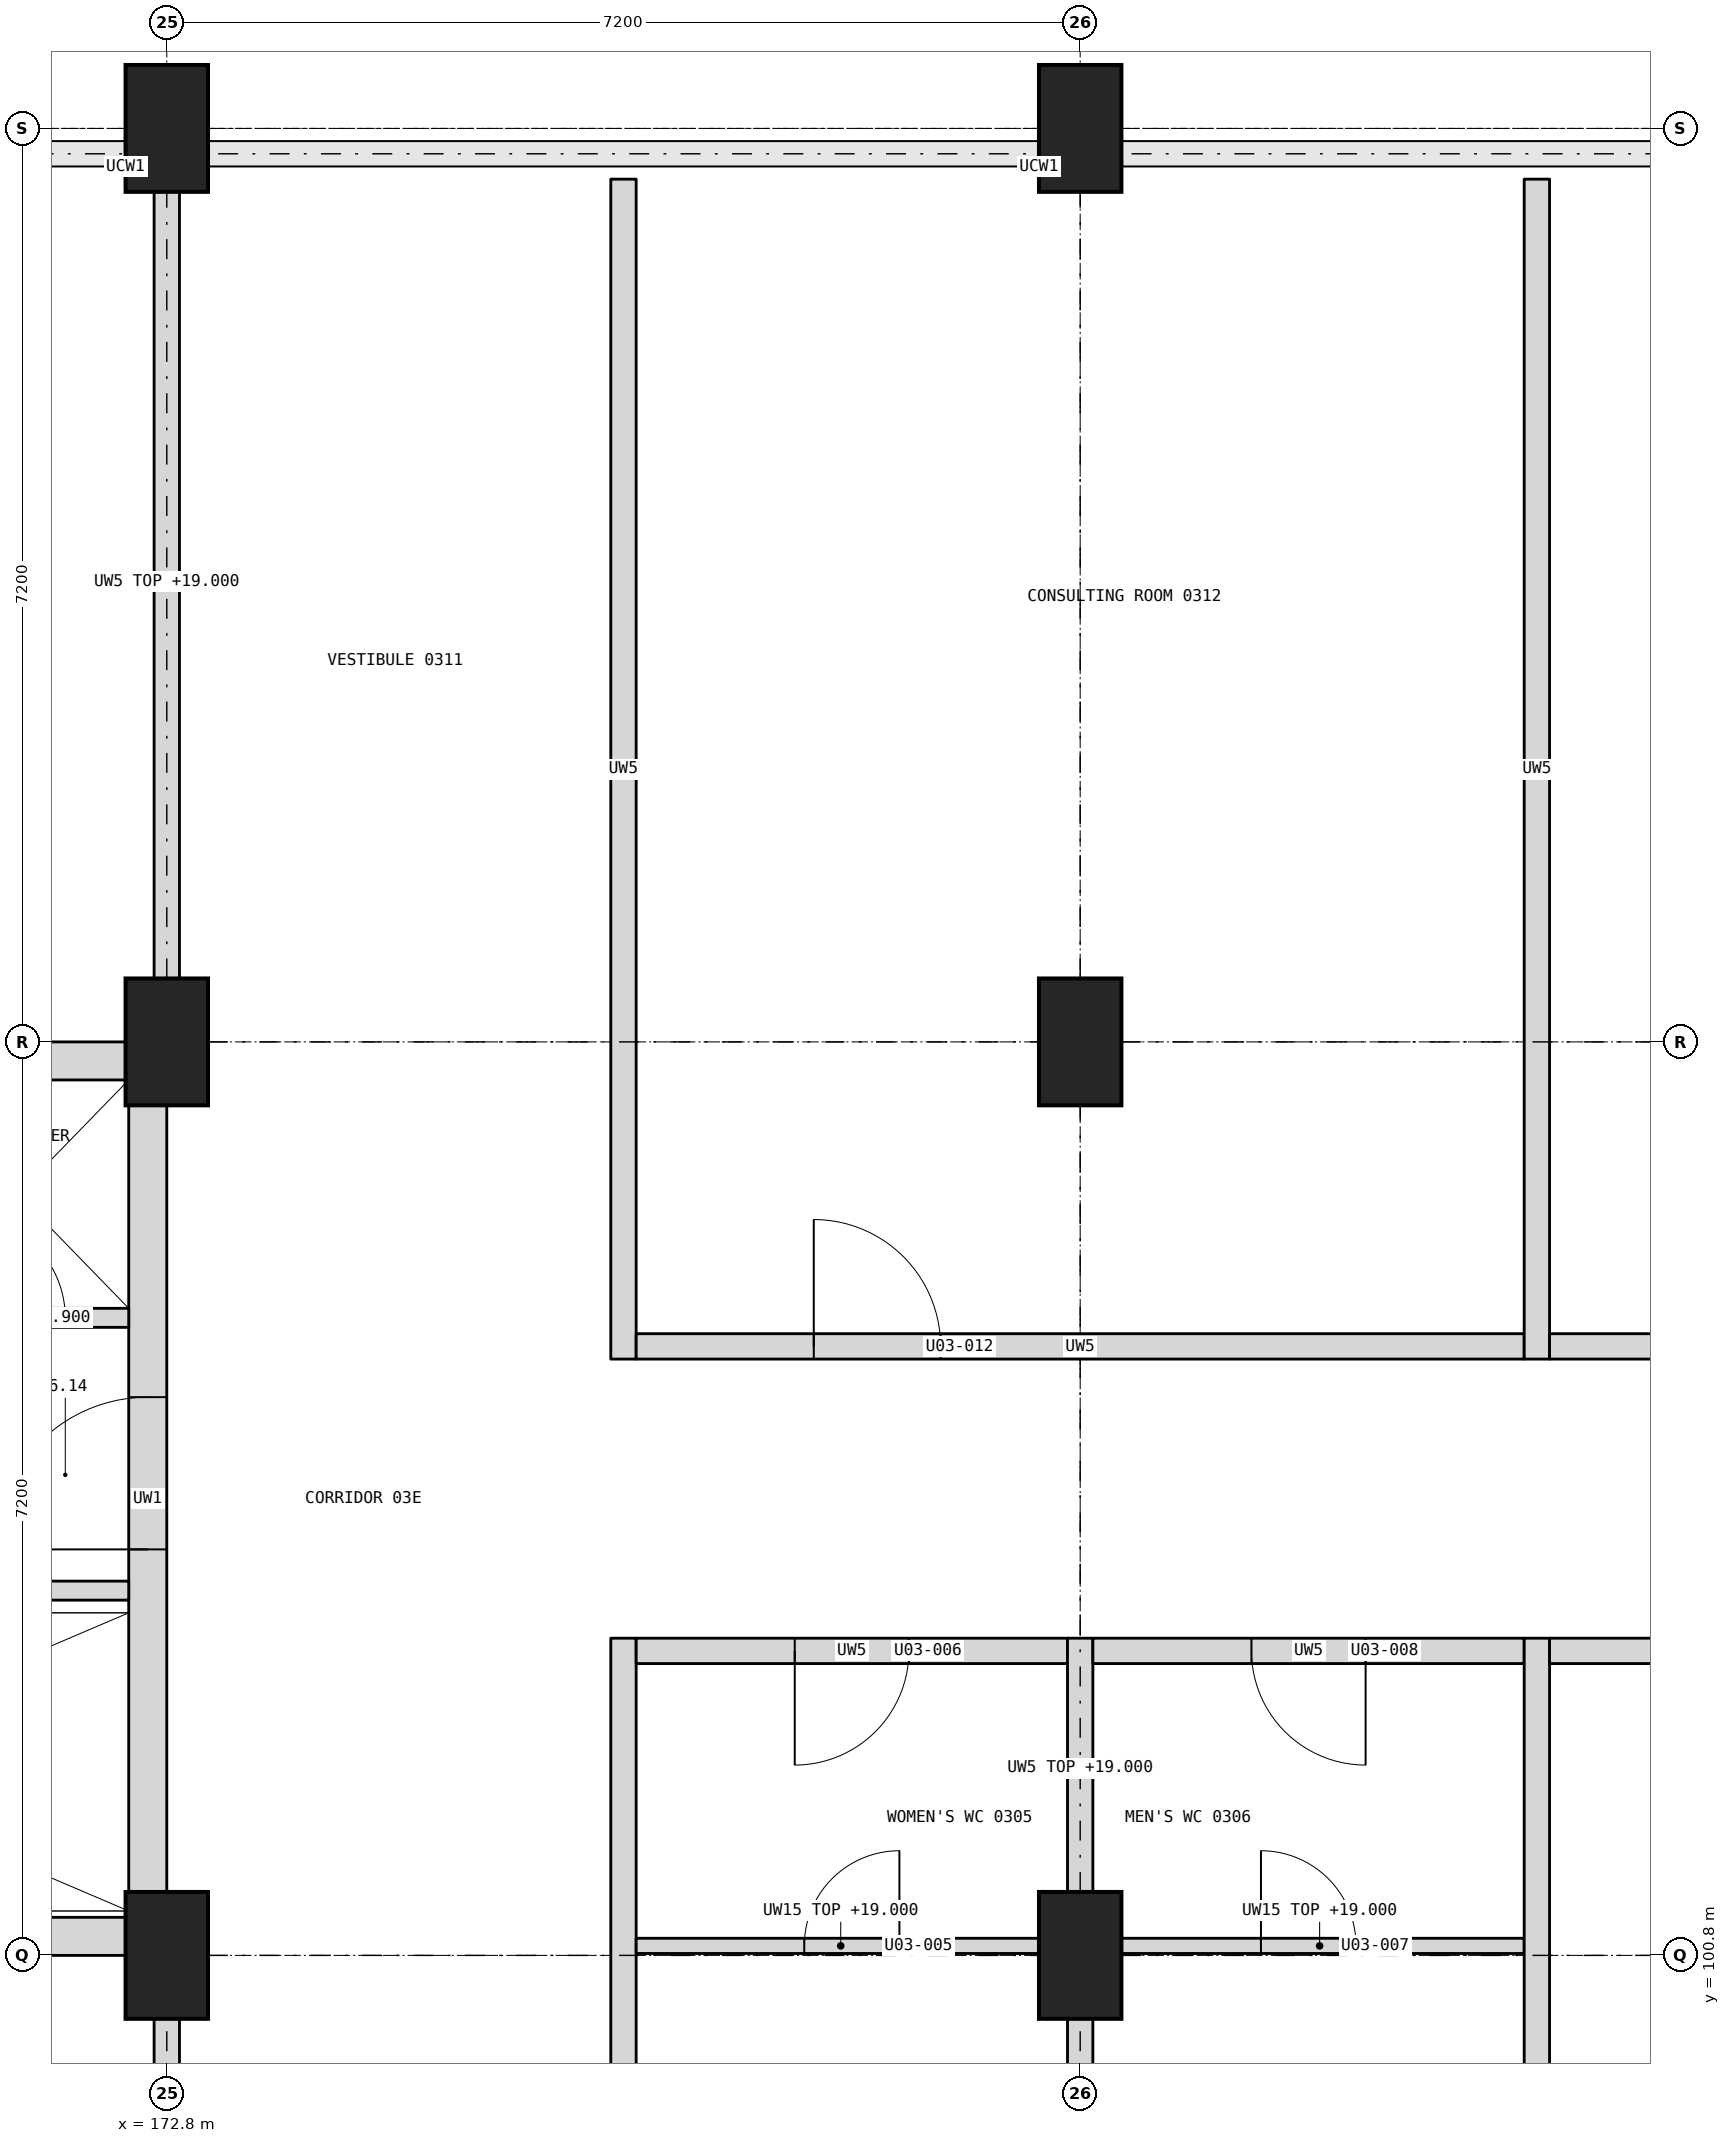
"""IFC4 building model, lengths in metres.
Left out: names, types, materials, properties, quantities, classifications, styles, units other than length and angle.
Written with IfcOpenShell. Run it as: python <this file> out.ifc"""

import sys

from ifc_helpers import new_model, si_unit, direction, frame, frame_2d, origin, origin_2d, place, context, subcontext, project, spatial, rectangle, extrude, element, fill, save


model = new_model("IFC4")
c1 = context("Model", 3, precision=1e-05, world=origin(), true_north=direction((0.0, 1.0)))
c2 = subcontext(c1, "Body", "Model", "MODEL_VIEW")
j1 = project(units=[si_unit("LENGTHUNIT", "METRE"), si_unit("PLANEANGLEUNIT", "RADIAN")], contexts=[c1])
p1 = place(None, origin())
s1 = spatial("IfcSite", under=j1, at=p1, CompositionType="ELEMENT")
p2 = place(p1, origin())
s2 = spatial("IfcBuilding", under=s1, at=p2, CompositionType="ELEMENT")
p3 = place(p2, frame((0.0, 0.0, 16.5)))
s3 = spatial("IfcBuildingStorey", under=s2, at=p3, CompositionType="ELEMENT", Elevation=16.5)
for number, where, z_axis, x_axis in (
    (1, (172.8, 100.8, 0.0), (0.0, 0.0, 1.0), (1.0, 0.0, 0.0)),
    (2, (172.8, 108.0, 0.0), (0.0, 0.0, 1.0), (1.0, 0.0, 0.0)),
    (3, (172.8, 115.2, 0.0), (0.0, 0.0, 1.0), (1.0, 0.0, 0.0)),
    (4, (180.0, 100.8, 0.0), (0.0, 0.0, 1.0), (1.0, 0.0, 0.0)),
    (5, (180.0, 108.0, 0.0), (0.0, 0.0, 1.0), (1.0, 0.0, 0.0)),
    (6, (180.0, 115.2, 0.0), (0.0, 0.0, 1.0), (1.0, 0.0, 0.0)),
):
    element("IfcColumn", number, at=place(p3, frame(where, z_axis=z_axis, x_axis=x_axis)), inside=s3, PredefinedType="COLUMN", context=c2, shape_type="SweptSolid", body=[
        extrude(rectangle(XDim=0.65, YDim=1.0, at=origin_2d()), origin(), (0.0, 0.0, 1.0), 3.4),
    ])
for number, where, z_axis, x_axis in (
    (7, (158.4, 100.95, 0.0), (0.0, 0.0, 1.0), (1.0, 0.0, 0.0)),
    (8, (158.4, 107.85, 0.0), (0.0, 0.0, 1.0), (1.0, 0.0, 0.0)),
):
    element("IfcWall", number, at=place(p3, frame(where, z_axis=z_axis, x_axis=x_axis)), inside=s3, PredefinedType="SHEAR", context=c2, shape_type="SweptSolid", body=[
        extrude(rectangle(XDim=14.4, YDim=0.3, at=frame_2d((7.2, 0.0))), origin(), (0.0, 0.0, 1.0), 3.4),
    ])
p4 = place(p3, frame((172.65, 101.1, 0.0), z_axis=(0.0, 0.0, 1.0), x_axis=(0.0, 1.0, 0.0)))
e9 = element("IfcWall", 9, at=p4, inside=s3, PredefinedType="SHEAR", context=c2, shape_type="SweptSolid", body=[
    extrude(rectangle(XDim=6.6, YDim=0.3, at=frame_2d((3.3, 0.0))), origin(), (0.0, 0.0, 1.0), 3.4),
])
p5 = place(p4, frame((2.9, 0.0, 0.0)))
e10 = element("IfcOpeningElement", 10, at=p5, cuts=e9, PredefinedType="OPENING", context=c2, shape_type="SweptSolid", body=[
    extrude(rectangle(XDim=1.2, YDim=2.1, at=frame_2d((0.6, 1.05))), frame((0.0, 0.16, 0.0), z_axis=(0.0, -1.0, 0.0), x_axis=(1.0, 0.0, 0.0)), (0.0, 0.0, 1.0), 0.32),
])
p6 = place(p3, frame((165.75, 103.675, 0.0), z_axis=(0.0, 0.0, 1.0), x_axis=(1.0, 0.0, 0.0)))
e11 = element("IfcWall", 11, at=p6, inside=s3, PredefinedType="SHEAR", context=c2, shape_type="SweptSolid", body=[
    extrude(rectangle(XDim=6.75, YDim=0.15, at=frame_2d((3.375, 0.0))), origin(), (0.0, 0.0, 1.0), 3.4),
])
p7 = place(p6, frame((0.1, 0.0, 0.0)))
e12 = element("IfcOpeningElement", 12, at=p7, cuts=e11, PredefinedType="OPENING", context=c2, shape_type="SweptSolid", body=[
    extrude(rectangle(XDim=1.0, YDim=2.1, at=frame_2d((0.5, 1.05))), frame((0.0, 0.085, 0.0), z_axis=(0.0, -1.0, 0.0), x_axis=(1.0, 0.0, 0.0)), (0.0, 0.0, 1.0), 0.17),
])
p8 = place(p3, frame((170.75, 105.825, 0.0), z_axis=(0.0, 0.0, 1.0), x_axis=(1.0, 0.0, 0.0)))
e13 = element("IfcWall", 13, at=p8, inside=s3, PredefinedType="PARTITIONING", context=c2, shape_type="SweptSolid", body=[
    extrude(rectangle(XDim=1.75, YDim=0.15, at=frame_2d((0.875, 0.0))), origin(), (0.0, 0.0, 1.0), 3.4),
])
p9 = place(p8, frame((0.45, 0.0, 0.0)))
e14 = element("IfcOpeningElement", 14, at=p9, cuts=e13, PredefinedType="OPENING", context=c2, shape_type="SweptSolid", body=[
    extrude(rectangle(XDim=0.8, YDim=2.1, at=frame_2d((0.4, 1.05))), frame((0.0, 0.085, 0.0), z_axis=(0.0, -1.0, 0.0), x_axis=(1.0, 0.0, 0.0)), (0.0, 0.0, 1.0), 0.17),
])
p10 = place(p3, frame((172.8, 94.0, 0.0), z_axis=(0.0, 0.0, 1.0), x_axis=(0.0, 1.0, 0.0)))
e15 = element("IfcWall", 15, at=p10, inside=s3, PredefinedType="PARTITIONING", context=c2, shape_type="SweptSolid", body=[
    extrude(rectangle(XDim=6.35, YDim=0.2, at=frame_2d((3.175, 0.0))), origin(), (0.0, 0.0, 1.0), 2.5),
])
p11 = place(p10, frame((2.3, 0.0, 0.0)))
e16 = element("IfcOpeningElement", 16, at=p11, cuts=e15, PredefinedType="OPENING", context=c2, shape_type="SweptSolid", body=[
    extrude(rectangle(XDim=1.8, YDim=2.1, at=frame_2d((0.9, 1.05))), frame((0.0, 0.11, 0.0), z_axis=(0.0, -1.0, 0.0), x_axis=(1.0, 0.0, 0.0)), (0.0, 0.0, 1.0), 0.22),
])
p12 = place(p3, frame((176.4, 94.0, 0.0), z_axis=(0.0, 0.0, 1.0), x_axis=(0.0, 1.0, 0.0)))
e17 = element("IfcWall", 17, at=p12, inside=s3, PredefinedType="PARTITIONING", context=c2, shape_type="SweptSolid", body=[
    extrude(rectangle(XDim=9.3, YDim=0.2, at=frame_2d((4.65, 0.0))), origin(), (0.0, 0.0, 1.0), 3.1),
])
p13 = place(p3, frame((176.5, 100.875, 0.0), z_axis=(0.0, 0.0, 1.0), x_axis=(1.0, 0.0, 0.0)))
e18 = element("IfcWall", 18, at=p13, inside=s3, PredefinedType="PARTITIONING", context=c2, shape_type="SweptSolid", body=[
    extrude(rectangle(XDim=3.225, YDim=0.12, at=frame_2d((1.613, 0.0))), origin(), (0.0, 0.0, 1.0), 2.5),
])
p14 = place(p13, frame((1.325, 0.0, 0.0)))
e19 = element("IfcOpeningElement", 19, at=p14, cuts=e18, PredefinedType="OPENING", context=c2, shape_type="SweptSolid", body=[
    extrude(rectangle(XDim=0.75, YDim=2.1, at=frame_2d((0.375, 1.05))), frame((0.0, 0.07, 0.0), z_axis=(0.0, -1.0, 0.0), x_axis=(1.0, 0.0, 0.0)), (0.0, 0.0, 1.0), 0.14),
])
p15 = place(p3, frame((176.5, 103.2, 0.0), z_axis=(0.0, 0.0, 1.0), x_axis=(1.0, 0.0, 0.0)))
e20 = element("IfcWall", 20, at=p15, inside=s3, PredefinedType="PARTITIONING", context=c2, shape_type="SweptSolid", body=[
    extrude(rectangle(XDim=3.4, YDim=0.2, at=frame_2d((1.7, 0.0))), origin(), (0.0, 0.0, 1.0), 3.1),
])
p16 = place(p15, frame((1.25, 0.0, 0.0)))
e21 = element("IfcOpeningElement", 21, at=p16, cuts=e20, PredefinedType="OPENING", context=c2, shape_type="SweptSolid", body=[
    extrude(rectangle(XDim=0.9, YDim=2.1, at=frame_2d((0.45, 1.05))), frame((0.0, 0.11, 0.0), z_axis=(0.0, -1.0, 0.0), x_axis=(1.0, 0.0, 0.0)), (0.0, 0.0, 1.0), 0.22),
])
p17 = place(p3, frame((180.0, 94.0, 0.0), z_axis=(0.0, 0.0, 1.0), x_axis=(0.0, 1.0, 0.0)))
e22 = element("IfcWall", 22, at=p17, inside=s3, PredefinedType="PARTITIONING", context=c2, shape_type="SweptSolid", body=[
    extrude(rectangle(XDim=6.35, YDim=0.2, at=frame_2d((3.175, 0.0))), origin(), (0.0, 0.0, 1.0), 2.5),
])
p18 = place(p3, frame((180.0, 101.25, 0.0), z_axis=(0.0, 0.0, 1.0), x_axis=(0.0, 1.0, 0.0)))
e23 = element("IfcWall", 23, at=p18, inside=s3, PredefinedType="PARTITIONING", context=c2, shape_type="SweptSolid", body=[
    extrude(rectangle(XDim=2.05, YDim=0.2, at=frame_2d((1.025, 0.0))), origin(), (0.0, 0.0, 1.0), 2.5),
])
p19 = place(p3, frame((180.275, 100.875, 0.0), z_axis=(0.0, 0.0, 1.0), x_axis=(1.0, 0.0, 0.0)))
e24 = element("IfcWall", 24, at=p19, inside=s3, PredefinedType="PARTITIONING", context=c2, shape_type="SweptSolid", body=[
    extrude(rectangle(XDim=3.225, YDim=0.12, at=frame_2d((1.613, 0.0))), origin(), (0.0, 0.0, 1.0), 2.5),
])
p20 = place(p19, frame((1.15, 0.0, 0.0)))
e25 = element("IfcOpeningElement", 25, at=p20, cuts=e24, PredefinedType="OPENING", context=c2, shape_type="SweptSolid", body=[
    extrude(rectangle(XDim=0.75, YDim=2.1, at=frame_2d((0.375, 1.05))), frame((0.0, 0.07, 0.0), z_axis=(0.0, -1.0, 0.0), x_axis=(1.0, 0.0, 0.0)), (0.0, 0.0, 1.0), 0.14),
])
p21 = place(p3, frame((180.1, 103.2, 0.0), z_axis=(0.0, 0.0, 1.0), x_axis=(1.0, 0.0, 0.0)))
e26 = element("IfcWall", 26, at=p21, inside=s3, PredefinedType="PARTITIONING", context=c2, shape_type="SweptSolid", body=[
    extrude(rectangle(XDim=3.4, YDim=0.2, at=frame_2d((1.7, 0.0))), origin(), (0.0, 0.0, 1.0), 3.1),
])
p22 = place(p21, frame((1.25, 0.0, 0.0)))
e27 = element("IfcOpeningElement", 27, at=p22, cuts=e26, PredefinedType="OPENING", context=c2, shape_type="SweptSolid", body=[
    extrude(rectangle(XDim=0.9, YDim=2.1, at=frame_2d((0.45, 1.05))), frame((0.0, 0.11, 0.0), z_axis=(0.0, -1.0, 0.0), x_axis=(1.0, 0.0, 0.0)), (0.0, 0.0, 1.0), 0.22),
])
p23 = place(p3, frame((183.6, 94.0, 0.0), z_axis=(0.0, 0.0, 1.0), x_axis=(0.0, 1.0, 0.0)))
e28 = element("IfcWall", 28, at=p23, inside=s3, PredefinedType="PARTITIONING", context=c2, shape_type="SweptSolid", body=[
    extrude(rectangle(XDim=9.3, YDim=0.2, at=frame_2d((4.65, 0.0))), origin(), (0.0, 0.0, 1.0), 3.1),
])
p24 = place(p3, frame((183.7, 103.2, 0.0), z_axis=(0.0, 0.0, 1.0), x_axis=(1.0, 0.0, 0.0)))
e29 = element("IfcWall", 29, at=p24, inside=s3, PredefinedType="PARTITIONING", context=c2, shape_type="SweptSolid", body=[
    extrude(rectangle(XDim=3.5, YDim=0.2, at=frame_2d((1.75, 0.0))), origin(), (0.0, 0.0, 1.0), 3.1),
])
p25 = place(p24, frame((1.4, 0.0, 0.0)))
e30 = element("IfcOpeningElement", 30, at=p25, cuts=e29, PredefinedType="OPENING", context=c2, shape_type="SweptSolid", body=[
    extrude(rectangle(XDim=1.0, YDim=2.1, at=frame_2d((0.5, 1.05))), frame((0.0, 0.11, 0.0), z_axis=(0.0, -1.0, 0.0), x_axis=(1.0, 0.0, 0.0)), (0.0, 0.0, 1.0), 0.22),
])
p26 = place(p3, frame((172.8, 108.45, 0.0), z_axis=(0.0, 0.0, 1.0), x_axis=(0.0, 1.0, 0.0)))
e31 = element("IfcWall", 31, at=p26, inside=s3, PredefinedType="PARTITIONING", context=c2, shape_type="SweptSolid", body=[
    extrude(rectangle(XDim=6.35, YDim=0.2, at=frame_2d((3.175, 0.0))), origin(), (0.0, 0.0, 1.0), 2.5),
])
p27 = place(p3, frame((176.4, 105.5, 0.0), z_axis=(0.0, 0.0, 1.0), x_axis=(0.0, 1.0, 0.0)))
e32 = element("IfcWall", 32, at=p27, inside=s3, PredefinedType="PARTITIONING", context=c2, shape_type="SweptSolid", body=[
    extrude(rectangle(XDim=9.3, YDim=0.2, at=frame_2d((4.65, 0.0))), origin(), (0.0, 0.0, 1.0), 3.1),
])
p28 = place(p3, frame((176.5, 105.6, 0.0), z_axis=(0.0, 0.0, 1.0), x_axis=(1.0, 0.0, 0.0)))
e33 = element("IfcWall", 33, at=p28, inside=s3, PredefinedType="PARTITIONING", context=c2, shape_type="SweptSolid", body=[
    extrude(rectangle(XDim=7.0, YDim=0.2, at=frame_2d((3.5, 0.0))), origin(), (0.0, 0.0, 1.0), 3.1),
])
p29 = place(p28, frame((1.4, 0.0, 0.0)))
e34 = element("IfcOpeningElement", 34, at=p29, cuts=e33, PredefinedType="OPENING", context=c2, shape_type="SweptSolid", body=[
    extrude(rectangle(XDim=1.0, YDim=2.1, at=frame_2d((0.5, 1.05))), frame((0.0, 0.11, 0.0), z_axis=(0.0, -1.0, 0.0), x_axis=(1.0, 0.0, 0.0)), (0.0, 0.0, 1.0), 0.22),
])
p30 = place(p3, frame((183.6, 105.5, 0.0), z_axis=(0.0, 0.0, 1.0), x_axis=(0.0, 1.0, 0.0)))
e35 = element("IfcWall", 35, at=p30, inside=s3, PredefinedType="PARTITIONING", context=c2, shape_type="SweptSolid", body=[
    extrude(rectangle(XDim=9.3, YDim=0.2, at=frame_2d((4.65, 0.0))), origin(), (0.0, 0.0, 1.0), 3.1),
])
p31 = place(p3, frame((183.7, 105.6, 0.0), z_axis=(0.0, 0.0, 1.0), x_axis=(1.0, 0.0, 0.0)))
e36 = element("IfcWall", 36, at=p31, inside=s3, PredefinedType="PARTITIONING", context=c2, shape_type="SweptSolid", body=[
    extrude(rectangle(XDim=3.5, YDim=0.2, at=frame_2d((1.75, 0.0))), origin(), (0.0, 0.0, 1.0), 3.1),
])
p32 = place(p31, frame((1.4, 0.0, 0.0)))
e37 = element("IfcOpeningElement", 37, at=p32, cuts=e36, PredefinedType="OPENING", context=c2, shape_type="SweptSolid", body=[
    extrude(rectangle(XDim=1.0, YDim=2.1, at=frame_2d((0.5, 1.05))), frame((0.0, 0.11, 0.0), z_axis=(0.0, -1.0, 0.0), x_axis=(1.0, 0.0, 0.0)), (0.0, 0.0, 1.0), 0.22),
])
p33 = place(p14, origin())
e38 = element("IfcDoor", 38, at=p33, inside=s3, OperationType="SINGLE_SWING_RIGHT", PredefinedType="DOOR", context=c2, shape_type="SweptSolid", body=[
    extrude(rectangle(XDim=0.75, YDim=2.1, at=frame_2d((0.375, 1.05))), frame((0.0, 0.025, 0.0), z_axis=(0.0, -1.0, 0.0), x_axis=(1.0, 0.0, 0.0)), (0.0, 0.0, 1.0), 0.05),
])
fill(e19, e38)
p34 = place(p16, frame((0.9, 0.0, 0.0), z_axis=(0.0, 0.0, 1.0), x_axis=(-1.0, 0.0, 0.0)))
e39 = element("IfcDoor", 39, at=p34, inside=s3, OperationType="SINGLE_SWING_RIGHT", PredefinedType="DOOR", context=c2, shape_type="SweptSolid", body=[
    extrude(rectangle(XDim=0.9, YDim=2.1, at=frame_2d((0.45, 1.05))), frame((0.0, 0.025, 0.0), z_axis=(0.0, -1.0, 0.0), x_axis=(1.0, 0.0, 0.0)), (0.0, 0.0, 1.0), 0.05),
])
fill(e21, e39)
p35 = place(p20, origin())
e40 = element("IfcDoor", 40, at=p35, inside=s3, OperationType="SINGLE_SWING_LEFT", PredefinedType="DOOR", context=c2, shape_type="SweptSolid", body=[
    extrude(rectangle(XDim=0.75, YDim=2.1, at=frame_2d((0.375, 1.05))), frame((0.0, 0.025, 0.0), z_axis=(0.0, -1.0, 0.0), x_axis=(1.0, 0.0, 0.0)), (0.0, 0.0, 1.0), 0.05),
])
fill(e25, e40)
p36 = place(p22, frame((0.9, 0.0, 0.0), z_axis=(0.0, 0.0, 1.0), x_axis=(-1.0, 0.0, 0.0)))
e41 = element("IfcDoor", 41, at=p36, inside=s3, OperationType="SINGLE_SWING_LEFT", PredefinedType="DOOR", context=c2, shape_type="SweptSolid", body=[
    extrude(rectangle(XDim=0.9, YDim=2.1, at=frame_2d((0.45, 1.05))), frame((0.0, 0.025, 0.0), z_axis=(0.0, -1.0, 0.0), x_axis=(1.0, 0.0, 0.0)), (0.0, 0.0, 1.0), 0.05),
])
fill(e27, e41)
p37 = place(p29, origin())
e42 = element("IfcDoor", 42, at=p37, inside=s3, OperationType="SINGLE_SWING_LEFT", PredefinedType="DOOR", context=c2, shape_type="SweptSolid", body=[
    extrude(rectangle(XDim=1.0, YDim=2.1, at=frame_2d((0.5, 1.05))), frame((0.0, 0.025, 0.0), z_axis=(0.0, -1.0, 0.0), x_axis=(1.0, 0.0, 0.0)), (0.0, 0.0, 1.0), 0.05),
])
fill(e34, e42)
p38 = place(p5, origin())
e43 = element("IfcDoor", 43, at=p38, inside=s3, OperationType="SINGLE_SWING_LEFT", PredefinedType="DOOR", context=c2, shape_type="SweptSolid", body=[
    extrude(rectangle(XDim=1.2, YDim=2.1, at=frame_2d((0.6, 1.05))), frame((0.0, 0.025, 0.0), z_axis=(0.0, -1.0, 0.0), x_axis=(1.0, 0.0, 0.0)), (0.0, 0.0, 1.0), 0.05),
])
fill(e10, e43)
p39 = place(p9, origin())
e44 = element("IfcDoor", 44, at=p39, inside=s3, OperationType="SINGLE_SWING_LEFT", PredefinedType="DOOR", context=c2, shape_type="SweptSolid", body=[
    extrude(rectangle(XDim=0.8, YDim=2.1, at=frame_2d((0.4, 1.05))), frame((0.0, 0.025, 0.0), z_axis=(0.0, -1.0, 0.0), x_axis=(1.0, 0.0, 0.0)), (0.0, 0.0, 1.0), 0.05),
])
fill(e14, e44)
save(model, sys.argv[1])
